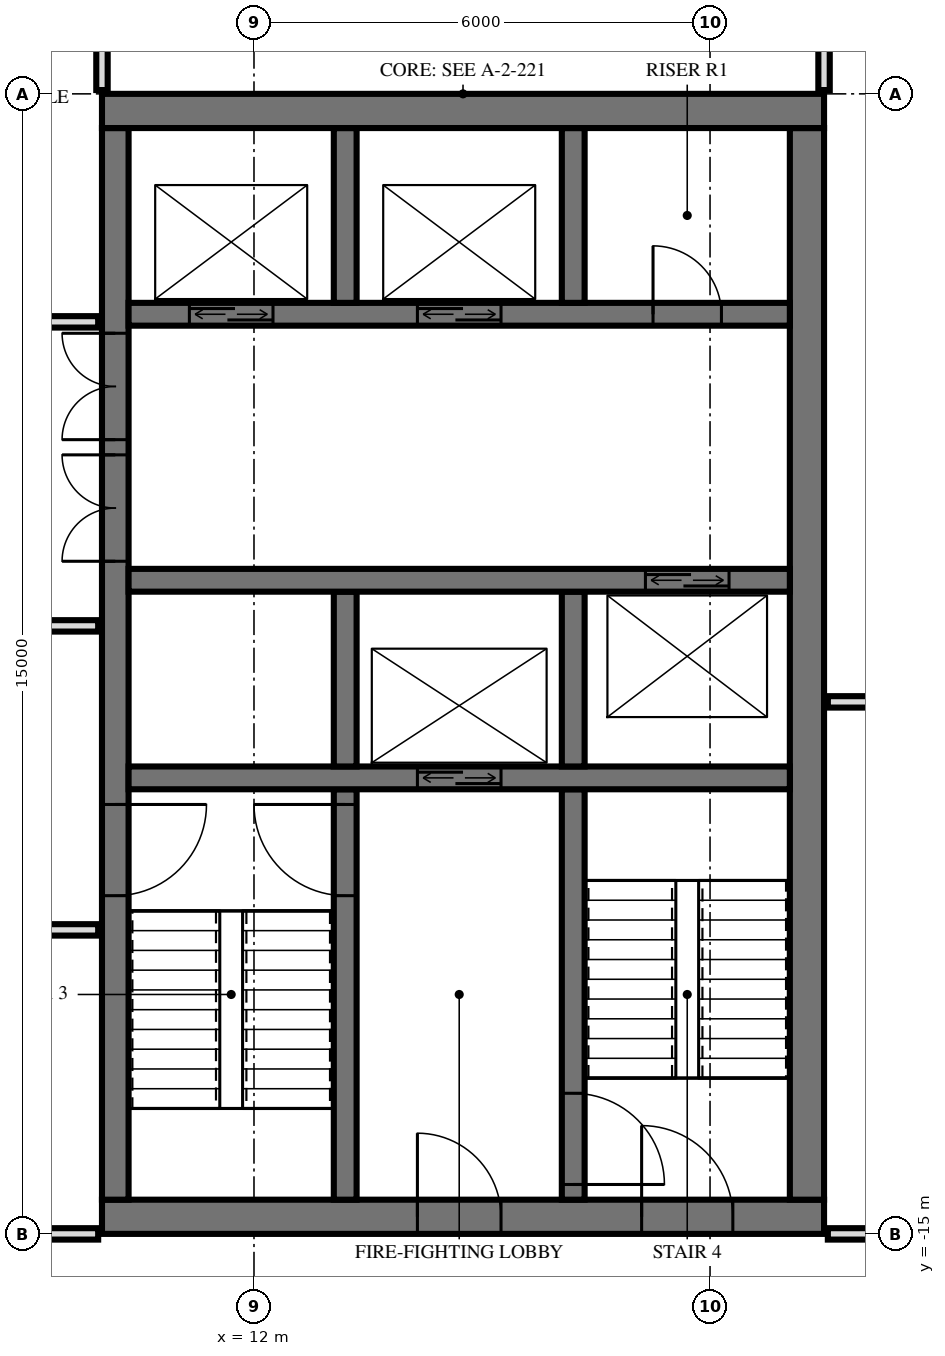
"""IFC4 building model, lengths in metres.
Left out: names, types, materials, properties, quantities, classifications, styles, units other than length and angle.
Written with IfcOpenShell. Run it as: python <this file> out.ifc"""

import sys

from ifc_helpers import new_model, si_unit, direction, frame, frame_2d, origin, place, context, subcontext, project, spatial, rectangle, extrude, element, fill, save


model = new_model("IFC4")
c1 = context("Model", 3, precision=1e-05, world=origin(), true_north=direction((0.0, 1.0)))
c2 = subcontext(c1, "Body", "Model", "MODEL_VIEW")
j1 = project(units=[si_unit("LENGTHUNIT", "METRE"), si_unit("PLANEANGLEUNIT", "RADIAN")], contexts=[c1])
p1 = place(None, origin())
s1 = spatial("IfcSite", under=j1, at=p1, CompositionType="ELEMENT")
p2 = place(p1, origin())
s2 = spatial("IfcBuilding", under=s1, at=p2, CompositionType="ELEMENT")
p3 = place(p2, frame((0.0, 0.0, 326.6)))
s3 = spatial("IfcBuildingStorey", under=s2, at=p3, CompositionType="ELEMENT", Elevation=326.6)
p4 = place(p3, frame((10.0, -0.225, 0.0), z_axis=(0.0, 0.0, 1.0), x_axis=(1.0, 0.0, 0.0)))
e1 = element("IfcWall", 1, at=p4, inside=s3, PredefinedType="SHEAR", context=c2, shape_type="SweptSolid", body=[
    extrude(rectangle(XDim=9.5, YDim=0.45, at=frame_2d((4.75, 0.0))), origin(), (0.0, 0.0, 1.0), 4.0),
])
p5 = place(p3, frame((10.0, -14.775, 0.0), z_axis=(0.0, 0.0, 1.0), x_axis=(1.0, 0.0, 0.0)))
e2 = element("IfcWall", 2, at=p5, inside=s3, PredefinedType="SHEAR", context=c2, shape_type="SweptSolid", body=[
    extrude(rectangle(XDim=9.5, YDim=0.45, at=frame_2d((4.75, 0.0))), origin(), (0.0, 0.0, 1.0), 4.0),
])
p6 = place(p5, frame((7.1, 0.0, 0.0)))
e3 = element("IfcOpeningElement", 3, at=p6, cuts=e2, PredefinedType="OPENING", context=c2, shape_type="SweptSolid", body=[
    extrude(rectangle(XDim=1.2, YDim=2.1, at=frame_2d((0.6, 1.05))), frame((0.0, 0.235, 0.0), z_axis=(0.0, -1.0, 0.0), x_axis=(1.0, 0.0, 0.0)), (0.0, 0.0, 1.0), 0.47),
])
p7 = place(p5, frame((4.15, 0.0, 0.0)))
e4 = element("IfcOpeningElement", 4, at=p7, cuts=e2, PredefinedType="OPENING", context=c2, shape_type="SweptSolid", body=[
    extrude(rectangle(XDim=1.1, YDim=2.1, at=frame_2d((0.55, 1.05))), frame((0.0, 0.235, 0.0), z_axis=(0.0, -1.0, 0.0), x_axis=(1.0, 0.0, 0.0)), (0.0, 0.0, 1.0), 0.47),
])
p8 = place(p3, frame((10.175, -14.55, 0.0), z_axis=(0.0, 0.0, 1.0), x_axis=(0.0, 1.0, 0.0)))
e5 = element("IfcWall", 5, at=p8, inside=s3, PredefinedType="SHEAR", context=c2, shape_type="SweptSolid", body=[
    extrude(rectangle(XDim=14.1, YDim=0.35, at=frame_2d((7.05, 0.0))), origin(), (0.0, 0.0, 1.0), 4.0),
])
p9 = place(p8, frame((8.4, 0.0, 0.0)))
e6 = element("IfcOpeningElement", 6, at=p9, cuts=e5, PredefinedType="OPENING", context=c2, shape_type="SweptSolid", body=[
    extrude(rectangle(XDim=1.4, YDim=2.4, at=frame_2d((0.7, 1.2))), frame((0.0, 0.185, 0.0), z_axis=(0.0, -1.0, 0.0), x_axis=(1.0, 0.0, 0.0)), (0.0, 0.0, 1.0), 0.37),
])
p10 = place(p8, frame((10.0, 0.0, 0.0)))
e7 = element("IfcOpeningElement", 7, at=p10, cuts=e5, PredefinedType="OPENING", context=c2, shape_type="SweptSolid", body=[
    extrude(rectangle(XDim=1.4, YDim=2.4, at=frame_2d((0.7, 1.2))), frame((0.0, 0.185, 0.0), z_axis=(0.0, -1.0, 0.0), x_axis=(1.0, 0.0, 0.0)), (0.0, 0.0, 1.0), 0.37),
])
p11 = place(p8, frame((4.0, 0.0, 0.0)))
e8 = element("IfcOpeningElement", 8, at=p11, cuts=e5, PredefinedType="OPENING", context=c2, shape_type="SweptSolid", body=[
    extrude(rectangle(XDim=1.2, YDim=2.1, at=frame_2d((0.6, 1.05))), frame((0.0, 0.185, 0.0), z_axis=(0.0, -1.0, 0.0), x_axis=(1.0, 0.0, 0.0)), (0.0, 0.0, 1.0), 0.37),
])
p12 = place(p3, frame((19.275, -14.55, 0.0), z_axis=(0.0, 0.0, 1.0), x_axis=(0.0, 1.0, 0.0)))
e9 = element("IfcWall", 9, at=p12, inside=s3, PredefinedType="SHEAR", context=c2, shape_type="SweptSolid", body=[
    extrude(rectangle(XDim=14.1, YDim=0.45, at=frame_2d((7.05, 0.0))), origin(), (0.0, 0.0, 1.0), 4.0),
])
p13 = place(p3, frame((10.35, -2.9, 0.0), z_axis=(0.0, 0.0, 1.0), x_axis=(1.0, 0.0, 0.0)))
e10 = element("IfcWall", 10, at=p13, inside=s3, PredefinedType="SHEAR", context=c2, shape_type="SweptSolid", body=[
    extrude(rectangle(XDim=8.7, YDim=0.3, at=frame_2d((4.35, 0.0))), origin(), (0.0, 0.0, 1.0), 4.0),
])
p14 = place(p13, frame((0.8, 0.0, 0.0)))
e11 = element("IfcOpeningElement", 11, at=p14, cuts=e10, PredefinedType="OPENING", context=c2, shape_type="SweptSolid", body=[
    extrude(rectangle(XDim=1.1, YDim=2.1, at=frame_2d((0.55, 1.05))), frame((0.0, 0.16, 0.0), z_axis=(0.0, -1.0, 0.0), x_axis=(1.0, 0.0, 0.0)), (0.0, 0.0, 1.0), 0.32),
])
p15 = place(p13, frame((3.8, 0.0, 0.0)))
e12 = element("IfcOpeningElement", 12, at=p15, cuts=e10, PredefinedType="OPENING", context=c2, shape_type="SweptSolid", body=[
    extrude(rectangle(XDim=1.1, YDim=2.1, at=frame_2d((0.55, 1.05))), frame((0.0, 0.16, 0.0), z_axis=(0.0, -1.0, 0.0), x_axis=(1.0, 0.0, 0.0)), (0.0, 0.0, 1.0), 0.32),
])
p16 = place(p13, frame((6.9, 0.0, 0.0)))
e13 = element("IfcOpeningElement", 13, at=p16, cuts=e10, PredefinedType="OPENING", context=c2, shape_type="SweptSolid", body=[
    extrude(rectangle(XDim=0.9, YDim=2.1, at=frame_2d((0.45, 1.05))), frame((0.0, 0.16, 0.0), z_axis=(0.0, -1.0, 0.0), x_axis=(1.0, 0.0, 0.0)), (0.0, 0.0, 1.0), 0.32),
])
p17 = place(p3, frame((10.35, -6.4, 0.0), z_axis=(0.0, 0.0, 1.0), x_axis=(1.0, 0.0, 0.0)))
e14 = element("IfcWall", 14, at=p17, inside=s3, PredefinedType="SHEAR", context=c2, shape_type="SweptSolid", body=[
    extrude(rectangle(XDim=8.7, YDim=0.3, at=frame_2d((4.35, 0.0))), origin(), (0.0, 0.0, 1.0), 4.0),
])
p18 = place(p17, frame((6.8, 0.0, 0.0)))
e15 = element("IfcOpeningElement", 15, at=p18, cuts=e14, PredefinedType="OPENING", context=c2, shape_type="SweptSolid", body=[
    extrude(rectangle(XDim=1.1, YDim=2.1, at=frame_2d((0.55, 1.05))), frame((0.0, 0.16, 0.0), z_axis=(0.0, -1.0, 0.0), x_axis=(1.0, 0.0, 0.0)), (0.0, 0.0, 1.0), 0.32),
])
p19 = place(p3, frame((10.35, -9.0, 0.0), z_axis=(0.0, 0.0, 1.0), x_axis=(1.0, 0.0, 0.0)))
e16 = element("IfcWall", 16, at=p19, inside=s3, PredefinedType="SHEAR", context=c2, shape_type="SweptSolid", body=[
    extrude(rectangle(XDim=8.7, YDim=0.3, at=frame_2d((4.35, 0.0))), origin(), (0.0, 0.0, 1.0), 4.0),
])
p20 = place(p19, frame((3.8, 0.0, 0.0)))
e17 = element("IfcOpeningElement", 17, at=p20, cuts=e16, PredefinedType="OPENING", context=c2, shape_type="SweptSolid", body=[
    extrude(rectangle(XDim=1.1, YDim=2.1, at=frame_2d((0.55, 1.05))), frame((0.0, 0.16, 0.0), z_axis=(0.0, -1.0, 0.0), x_axis=(1.0, 0.0, 0.0)), (0.0, 0.0, 1.0), 0.32),
])
for number, where, z_axis, x_axis in (
    (18, (13.2, -2.75, 0.0), (0.0, 0.0, 1.0), (0.0, 1.0, 0.0)),
    (19, (13.2, -8.85, 0.0), (0.0, 0.0, 1.0), (0.0, 1.0, 0.0)),
):
    element("IfcWall", number, at=place(p3, frame(where, z_axis=z_axis, x_axis=x_axis)), inside=s3, PredefinedType="SHEAR", context=c2, shape_type="SweptSolid", body=[
        extrude(rectangle(XDim=2.3, YDim=0.3, at=frame_2d((1.15, 0.0))), origin(), (0.0, 0.0, 1.0), 4.0),
    ])
p21 = place(p3, frame((13.2, -14.55, 0.0), z_axis=(0.0, 0.0, 1.0), x_axis=(0.0, 1.0, 0.0)))
e20 = element("IfcWall", 20, at=p21, inside=s3, PredefinedType="SHEAR", context=c2, shape_type="SweptSolid", body=[
    extrude(rectangle(XDim=5.4, YDim=0.3, at=frame_2d((2.7, 0.0))), origin(), (0.0, 0.0, 1.0), 4.0),
])
p22 = place(p21, frame((4.0, 0.0, 0.0)))
e21 = element("IfcOpeningElement", 21, at=p22, cuts=e20, PredefinedType="OPENING", context=c2, shape_type="SweptSolid", body=[
    extrude(rectangle(XDim=1.2, YDim=2.1, at=frame_2d((0.6, 1.05))), frame((0.0, 0.16, 0.0), z_axis=(0.0, -1.0, 0.0), x_axis=(1.0, 0.0, 0.0)), (0.0, 0.0, 1.0), 0.32),
])
for number, where, z_axis, x_axis in (
    (22, (16.2, -2.75, 0.0), (0.0, 0.0, 1.0), (0.0, 1.0, 0.0)),
    (23, (16.2, -8.85, 0.0), (0.0, 0.0, 1.0), (0.0, 1.0, 0.0)),
):
    element("IfcWall", number, at=place(p3, frame(where, z_axis=z_axis, x_axis=x_axis)), inside=s3, PredefinedType="SHEAR", context=c2, shape_type="SweptSolid", body=[
        extrude(rectangle(XDim=2.3, YDim=0.3, at=frame_2d((1.15, 0.0))), origin(), (0.0, 0.0, 1.0), 4.0),
    ])
p23 = place(p3, frame((16.2, -14.55, 0.0), z_axis=(0.0, 0.0, 1.0), x_axis=(0.0, 1.0, 0.0)))
e24 = element("IfcWall", 24, at=p23, inside=s3, PredefinedType="SHEAR", context=c2, shape_type="SweptSolid", body=[
    extrude(rectangle(XDim=5.4, YDim=0.3, at=frame_2d((2.7, 0.0))), origin(), (0.0, 0.0, 1.0), 4.0),
])
p24 = place(p23, frame((0.2, 0.0, 0.0)))
e25 = element("IfcOpeningElement", 25, at=p24, cuts=e24, PredefinedType="OPENING", context=c2, shape_type="SweptSolid", body=[
    extrude(rectangle(XDim=1.2, YDim=2.1, at=frame_2d((0.6, 1.05))), frame((0.0, 0.16, 0.0), z_axis=(0.0, -1.0, 0.0), x_axis=(1.0, 0.0, 0.0)), (0.0, 0.0, 1.0), 0.32),
])
p25 = place(p3, frame((19.5, 0.05, 0.0), z_axis=(0.0, 0.0, 1.0), x_axis=(0.0, 1.0, 0.0)))
e26 = element("IfcWall", 26, at=p25, inside=s3, PredefinedType="PARTITIONING", context=c2, shape_type="SweptSolid", body=[
    extrude(rectangle(XDim=4.403, YDim=0.15, at=frame_2d((2.202, 0.0))), origin(), (0.0, 0.0, 1.0), 3.72),
])
p26 = place(p3, frame((10.0, 0.05, 0.0), z_axis=(0.0, 0.0, 1.0), x_axis=(0.0, 1.0, 0.0)))
e27 = element("IfcWall", 27, at=p26, inside=s3, PredefinedType="PLUMBINGWALL", context=c2, shape_type="SweptSolid", body=[
    extrude(rectangle(XDim=4.702, YDim=0.15, at=frame_2d((2.351, 0.0))), origin(), (0.0, 0.0, 1.0), 3.72),
])
p27 = place(p3, frame((-3.506, -15.0, 0.0), z_axis=(0.0, 0.0, 1.0), x_axis=(1.0, 0.0, 0.0)))
e28 = element("IfcWall", 28, at=p27, inside=s3, PredefinedType="PARTITIONING", context=c2, shape_type="SweptSolid", body=[
    extrude(rectangle(XDim=13.456, YDim=0.15, at=frame_2d((6.728, 0.0))), origin(), (0.0, 0.0, 1.0), 3.084),
])
p28 = place(p27, frame((6.253, 0.0, 0.0)))
e29 = element("IfcOpeningElement", 29, at=p28, cuts=e28, PredefinedType="OPENING", context=c2, shape_type="SweptSolid", body=[
    extrude(rectangle(XDim=1.0, YDim=2.1, at=frame_2d((0.5, 1.05))), frame((0.0, 0.085, 0.0), z_axis=(0.0, -1.0, 0.0), x_axis=(1.0, 0.0, 0.0)), (0.0, 0.0, 1.0), 0.17),
])
p29 = place(p3, frame((19.55, -15.0, 0.0), z_axis=(0.0, 0.0, 1.0), x_axis=(1.0, 0.0, 0.0)))
e30 = element("IfcWall", 30, at=p29, inside=s3, PredefinedType="PARTITIONING", context=c2, shape_type="SweptSolid", body=[
    extrude(rectangle(XDim=3.49, YDim=0.15, at=frame_2d((1.745, 0.0))), origin(), (0.0, 0.0, 1.0), 3.72),
])
p30 = place(p29, frame((1.311, 0.0, 0.0)))
e31 = element("IfcOpeningElement", 31, at=p30, cuts=e30, PredefinedType="OPENING", context=c2, shape_type="SweptSolid", body=[
    extrude(rectangle(XDim=1.0, YDim=2.1, at=frame_2d((0.5, 1.05))), frame((0.0, 0.085, 0.0), z_axis=(0.0, -1.0, 0.0), x_axis=(1.0, 0.0, 0.0)), (0.0, 0.0, 1.0), 0.17),
])
p31 = place(p3, frame((-9.95, -11.0, 0.0), z_axis=(0.0, 0.0, 1.0), x_axis=(1.0, 0.0, 0.0)))
e32 = element("IfcWall", 32, at=p31, inside=s3, PredefinedType="PARTITIONING", context=c2, shape_type="SweptSolid", body=[
    extrude(rectangle(XDim=19.9, YDim=0.15, at=frame_2d((9.95, 0.0))), origin(), (0.0, 0.0, 1.0), 3.72),
])
p32 = place(p31, frame((9.45, 0.0, 0.0)))
e33 = element("IfcOpeningElement", 33, at=p32, cuts=e32, PredefinedType="OPENING", context=c2, shape_type="SweptSolid", body=[
    extrude(rectangle(XDim=1.0, YDim=2.1, at=frame_2d((0.5, 1.05))), frame((0.0, 0.085, 0.0), z_axis=(0.0, -1.0, 0.0), x_axis=(1.0, 0.0, 0.0)), (0.0, 0.0, 1.0), 0.17),
])
p33 = place(p31, frame((2.2, 0.0, 0.0)))
e34 = element("IfcOpeningElement", 34, at=p33, cuts=e32, PredefinedType="OPENING", context=c2, shape_type="SweptSolid", body=[
    extrude(rectangle(XDim=1.0, YDim=2.1, at=frame_2d((0.5, 1.05))), frame((0.0, 0.085, 0.0), z_axis=(0.0, -1.0, 0.0), x_axis=(1.0, 0.0, 0.0)), (0.0, 0.0, 1.0), 0.17),
])
p34 = place(p3, frame((19.55, -8.0, 0.0), z_axis=(0.0, 0.0, 1.0), x_axis=(1.0, 0.0, 0.0)))
e35 = element("IfcWall", 35, at=p34, inside=s3, PredefinedType="PARTITIONING", context=c2, shape_type="SweptSolid", body=[
    extrude(rectangle(XDim=2.631, YDim=0.15, at=frame_2d((1.315, 0.0))), origin(), (0.0, 0.0, 1.0), 3.253),
])
p35 = place(p34, frame((0.931, 0.0, 0.0)))
e36 = element("IfcOpeningElement", 36, at=p35, cuts=e35, PredefinedType="OPENING", context=c2, shape_type="SweptSolid", body=[
    extrude(rectangle(XDim=0.9, YDim=2.1, at=frame_2d((0.45, 1.05))), frame((0.0, 0.085, 0.0), z_axis=(0.0, -1.0, 0.0), x_axis=(1.0, 0.0, 0.0)), (0.0, 0.0, 1.0), 0.17),
])
p36 = place(p3, frame((-9.95, -7.0, 0.0), z_axis=(0.0, 0.0, 1.0), x_axis=(1.0, 0.0, 0.0)))
e37 = element("IfcWall", 37, at=p36, inside=s3, PredefinedType="PARTITIONING", context=c2, shape_type="SweptSolid", body=[
    extrude(rectangle(XDim=19.9, YDim=0.15, at=frame_2d((9.95, 0.0))), origin(), (0.0, 0.0, 1.0), 3.72),
])
p37 = place(p36, frame((9.45, 0.0, 0.0)))
e38 = element("IfcOpeningElement", 38, at=p37, cuts=e37, PredefinedType="OPENING", context=c2, shape_type="SweptSolid", body=[
    extrude(rectangle(XDim=1.0, YDim=2.1, at=frame_2d((0.5, 1.05))), frame((0.0, 0.085, 0.0), z_axis=(0.0, -1.0, 0.0), x_axis=(1.0, 0.0, 0.0)), (0.0, 0.0, 1.0), 0.17),
])
p38 = place(p36, frame((16.7, 0.0, 0.0)))
e39 = element("IfcOpeningElement", 39, at=p38, cuts=e37, PredefinedType="OPENING", context=c2, shape_type="SweptSolid", body=[
    extrude(rectangle(XDim=1.0, YDim=2.1, at=frame_2d((0.5, 1.05))), frame((0.0, 0.085, 0.0), z_axis=(0.0, -1.0, 0.0), x_axis=(1.0, 0.0, 0.0)), (0.0, 0.0, 1.0), 0.17),
])
p39 = place(p3, frame((-9.95, -3.0, 0.0), z_axis=(0.0, 0.0, 1.0), x_axis=(1.0, 0.0, 0.0)))
e40 = element("IfcWall", 40, at=p39, inside=s3, PredefinedType="PARTITIONING", context=c2, shape_type="SweptSolid", body=[
    extrude(rectangle(XDim=19.9, YDim=0.15, at=frame_2d((9.95, 0.0))), origin(), (0.0, 0.0, 1.0), 3.72),
])
p40 = place(p39, frame((2.2, 0.0, 0.0)))
e41 = element("IfcOpeningElement", 41, at=p40, cuts=e40, PredefinedType="OPENING", context=c2, shape_type="SweptSolid", body=[
    extrude(rectangle(XDim=1.0, YDim=2.1, at=frame_2d((0.5, 1.05))), frame((0.0, 0.085, 0.0), z_axis=(0.0, -1.0, 0.0), x_axis=(1.0, 0.0, 0.0)), (0.0, 0.0, 1.0), 0.17),
])
p41 = place(p39, frame((7.2, 0.0, 0.0)))
e42 = element("IfcOpeningElement", 42, at=p41, cuts=e40, PredefinedType="OPENING", context=c2, shape_type="SweptSolid", body=[
    extrude(rectangle(XDim=1.0, YDim=2.1, at=frame_2d((0.5, 1.05))), frame((0.0, 0.085, 0.0), z_axis=(0.0, -1.0, 0.0), x_axis=(1.0, 0.0, 0.0)), (0.0, 0.0, 1.0), 0.17),
])
p42 = place(p39, frame((11.7, 0.0, 0.0)))
e43 = element("IfcOpeningElement", 43, at=p42, cuts=e40, PredefinedType="OPENING", context=c2, shape_type="SweptSolid", body=[
    extrude(rectangle(XDim=1.0, YDim=2.1, at=frame_2d((0.5, 1.05))), frame((0.0, 0.085, 0.0), z_axis=(0.0, -1.0, 0.0), x_axis=(1.0, 0.0, 0.0)), (0.0, 0.0, 1.0), 0.17),
])
p43 = place(p39, frame((15.45, 0.0, 0.0)))
e44 = element("IfcOpeningElement", 44, at=p43, cuts=e40, PredefinedType="OPENING", context=c2, shape_type="SweptSolid", body=[
    extrude(rectangle(XDim=1.0, YDim=2.1, at=frame_2d((0.5, 1.05))), frame((0.0, 0.085, 0.0), z_axis=(0.0, -1.0, 0.0), x_axis=(1.0, 0.0, 0.0)), (0.0, 0.0, 1.0), 0.17),
])
p44 = place(p39, frame((18.2, 0.0, 0.0)))
e45 = element("IfcOpeningElement", 45, at=p44, cuts=e40, PredefinedType="OPENING", context=c2, shape_type="SweptSolid", body=[
    extrude(rectangle(XDim=1.0, YDim=2.1, at=frame_2d((0.5, 1.05))), frame((0.0, 0.085, 0.0), z_axis=(0.0, -1.0, 0.0), x_axis=(1.0, 0.0, 0.0)), (0.0, 0.0, 1.0), 0.17),
])
p45 = place(p14, origin())
e46 = element("IfcDoor", 46, at=p45, inside=s3, OperationType="DOUBLE_DOOR_SLIDING", PredefinedType="USERDEFINED", context=c2, shape_type="SweptSolid", body=[
    extrude(rectangle(XDim=1.1, YDim=2.1, at=frame_2d((0.55, 1.05))), frame((0.0, 0.025, 0.0), z_axis=(0.0, -1.0, 0.0), x_axis=(1.0, 0.0, 0.0)), (0.0, 0.0, 1.0), 0.05),
])
fill(e11, e46)
p46 = place(p15, origin())
e47 = element("IfcDoor", 47, at=p46, inside=s3, OperationType="DOUBLE_DOOR_SLIDING", PredefinedType="USERDEFINED", context=c2, shape_type="SweptSolid", body=[
    extrude(rectangle(XDim=1.1, YDim=2.1, at=frame_2d((0.55, 1.05))), frame((0.0, 0.025, 0.0), z_axis=(0.0, -1.0, 0.0), x_axis=(1.0, 0.0, 0.0)), (0.0, 0.0, 1.0), 0.05),
])
fill(e12, e47)
p47 = place(p20, origin())
e48 = element("IfcDoor", 48, at=p47, inside=s3, OperationType="DOUBLE_DOOR_SLIDING", PredefinedType="USERDEFINED", context=c2, shape_type="SweptSolid", body=[
    extrude(rectangle(XDim=1.1, YDim=2.1, at=frame_2d((0.55, 1.05))), frame((0.0, 0.025, 0.0), z_axis=(0.0, -1.0, 0.0), x_axis=(1.0, 0.0, 0.0)), (0.0, 0.0, 1.0), 0.05),
])
fill(e17, e48)
p48 = place(p18, origin())
e49 = element("IfcDoor", 49, at=p48, inside=s3, OperationType="DOUBLE_DOOR_SLIDING", PredefinedType="USERDEFINED", context=c2, shape_type="SweptSolid", body=[
    extrude(rectangle(XDim=1.1, YDim=2.1, at=frame_2d((0.55, 1.05))), frame((0.0, 0.025, 0.0), z_axis=(0.0, -1.0, 0.0), x_axis=(1.0, 0.0, 0.0)), (0.0, 0.0, 1.0), 0.05),
])
fill(e15, e49)
p49 = place(p9, origin())
e50 = element("IfcDoor", 50, at=p49, inside=s3, OperationType="DOUBLE_DOOR_SINGLE_SWING", PredefinedType="DOOR", context=c2, shape_type="SweptSolid", body=[
    extrude(rectangle(XDim=1.4, YDim=2.4, at=frame_2d((0.7, 1.2))), frame((0.0, 0.025, 0.0), z_axis=(0.0, -1.0, 0.0), x_axis=(1.0, 0.0, 0.0)), (0.0, 0.0, 1.0), 0.05),
])
fill(e6, e50)
p50 = place(p10, origin())
e51 = element("IfcDoor", 51, at=p50, inside=s3, OperationType="DOUBLE_DOOR_SINGLE_SWING", PredefinedType="DOOR", context=c2, shape_type="SweptSolid", body=[
    extrude(rectangle(XDim=1.4, YDim=2.4, at=frame_2d((0.7, 1.2))), frame((0.0, 0.025, 0.0), z_axis=(0.0, -1.0, 0.0), x_axis=(1.0, 0.0, 0.0)), (0.0, 0.0, 1.0), 0.05),
])
fill(e7, e51)
p51 = place(p11, frame((0.6, 0.0, 0.0), z_axis=(0.0, 0.0, 1.0), x_axis=(-1.0, 0.0, 0.0)))
e52 = element("IfcDoor", 52, at=p51, inside=s3, OperationType="SINGLE_SWING_RIGHT", PredefinedType="DOOR", context=c2, shape_type="SweptSolid", body=[
    extrude(rectangle(XDim=1.2, YDim=2.1, at=frame_2d((0.0, 1.05))), frame((0.0, -0.025, 0.0), z_axis=(0.0, 1.0, 0.0), x_axis=(-1.0, 0.0, 0.0)), (0.0, 0.0, 1.0), 0.05),
])
fill(e8, e52)
p52 = place(p6, origin())
e53 = element("IfcDoor", 53, at=p52, inside=s3, OperationType="SINGLE_SWING_RIGHT", PredefinedType="DOOR", context=c2, shape_type="SweptSolid", body=[
    extrude(rectangle(XDim=1.2, YDim=2.1, at=frame_2d((0.6, 1.05))), frame((0.0, 0.025, 0.0), z_axis=(0.0, -1.0, 0.0), x_axis=(1.0, 0.0, 0.0)), (0.0, 0.0, 1.0), 0.05),
])
fill(e3, e53)
p53 = place(p7, origin())
e54 = element("IfcDoor", 54, at=p53, inside=s3, OperationType="SINGLE_SWING_RIGHT", PredefinedType="DOOR", context=c2, shape_type="SweptSolid", body=[
    extrude(rectangle(XDim=1.1, YDim=2.1, at=frame_2d((0.55, 1.05))), frame((0.0, 0.025, 0.0), z_axis=(0.0, -1.0, 0.0), x_axis=(1.0, 0.0, 0.0)), (0.0, 0.0, 1.0), 0.05),
])
fill(e4, e54)
p54 = place(p16, origin())
e55 = element("IfcDoor", 55, at=p54, inside=s3, OperationType="SINGLE_SWING_RIGHT", PredefinedType="DOOR", context=c2, shape_type="SweptSolid", body=[
    extrude(rectangle(XDim=0.9, YDim=2.1, at=frame_2d((0.45, 1.05))), frame((0.0, 0.025, 0.0), z_axis=(0.0, -1.0, 0.0), x_axis=(1.0, 0.0, 0.0)), (0.0, 0.0, 1.0), 0.05),
])
fill(e13, e55)
p55 = place(p22, origin())
e56 = element("IfcDoor", 56, at=p55, inside=s3, OperationType="SINGLE_SWING_LEFT", PredefinedType="DOOR", context=c2, shape_type="SweptSolid", body=[
    extrude(rectangle(XDim=1.2, YDim=2.1, at=frame_2d((0.6, 1.05))), frame((0.0, 0.025, 0.0), z_axis=(0.0, -1.0, 0.0), x_axis=(1.0, 0.0, 0.0)), (0.0, 0.0, 1.0), 0.05),
])
fill(e21, e56)
p56 = place(p24, frame((0.6, 0.0, 0.0), z_axis=(0.0, 0.0, 1.0), x_axis=(-1.0, 0.0, 0.0)))
e57 = element("IfcDoor", 57, at=p56, inside=s3, OperationType="SINGLE_SWING_LEFT", PredefinedType="DOOR", context=c2, shape_type="SweptSolid", body=[
    extrude(rectangle(XDim=1.2, YDim=2.1, at=frame_2d((0.0, 1.05))), frame((0.0, -0.025, 0.0), z_axis=(0.0, 1.0, 0.0), x_axis=(-1.0, 0.0, 0.0)), (0.0, 0.0, 1.0), 0.05),
])
fill(e25, e57)
save(model, sys.argv[1])
